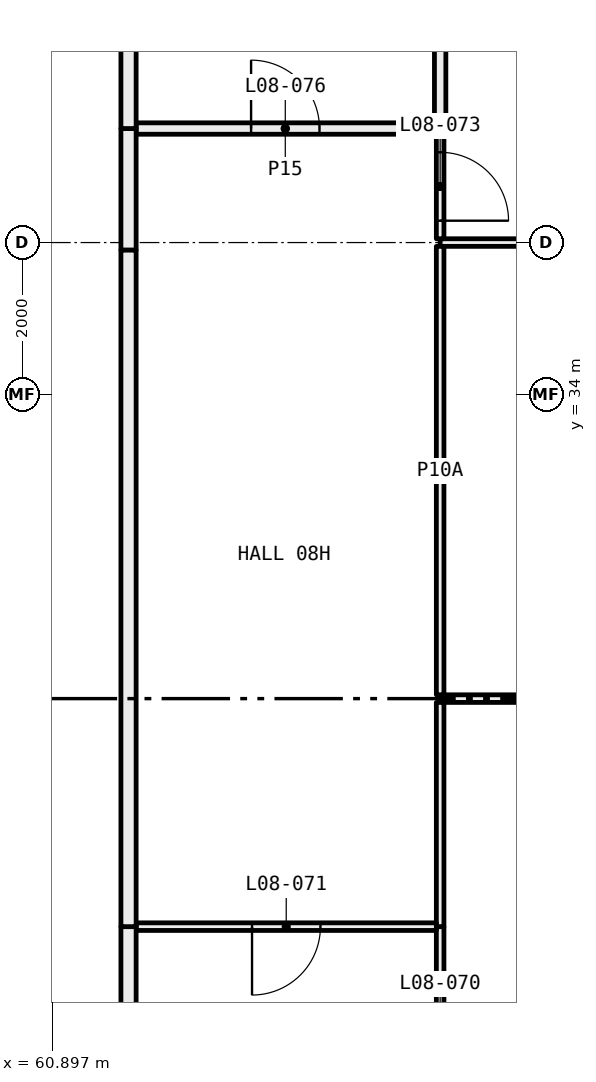
"""IFC4 building model, lengths in metres.
Left out: names, types, materials, properties, quantities, classifications, styles, units other than length and angle.
Written with IfcOpenShell. Run it as: python <this file> out.ifc"""

import sys

from ifc_helpers import new_model, si_unit, direction, frame, frame_2d, origin, place, context, subcontext, project, spatial, rectangle, extrude, element, fill, save


model = new_model("IFC4")
c1 = context("Model", 3, precision=1e-05, world=origin(), true_north=direction((0.0, 1.0)))
c2 = subcontext(c1, "Body", "Model", "MODEL_VIEW")
j1 = project(units=[si_unit("LENGTHUNIT", "METRE"), si_unit("PLANEANGLEUNIT", "RADIAN")], contexts=[c1])
p1 = place(None, origin())
s1 = spatial("IfcSite", under=j1, at=p1, CompositionType="ELEMENT")
p2 = place(p1, origin())
s2 = spatial("IfcBuilding", under=s1, at=p2, CompositionType="ELEMENT")
p3 = place(p2, frame((0.0, 0.0, 40.35)))
s3 = spatial("IfcBuildingStorey", under=s2, at=p3, CompositionType="ELEMENT", Elevation=40.35)
p4 = place(p3, frame((71.28, 30.0, 0.0), z_axis=(0.0, 0.0, 1.0), x_axis=(-1.0, 0.0, 0.0)))
e1 = element("IfcWall", 1, at=p4, inside=s3, PredefinedType="PARTITIONING", context=c2, shape_type="SweptSolid", body=[
    extrude(rectangle(XDim=5.28, YDim=0.1, at=frame_2d((2.64, 0.0))), origin(), (0.0, 0.0, 1.0), 3.05),
])
p5 = place(p4, frame((2.19, 0.0, 0.0)))
e2 = element("IfcOpeningElement", 2, at=p5, cuts=e1, PredefinedType="OPENING", context=c2, shape_type="SweptSolid", body=[
    extrude(rectangle(XDim=0.9, YDim=2.1, at=frame_2d((0.45, 1.05))), frame((0.0, 0.06, 0.0), z_axis=(0.0, -1.0, 0.0), x_axis=(1.0, 0.0, 0.0)), (0.0, 0.0, 1.0), 0.12),
])
p6 = place(p3, frame((66.0, 27.0, 0.0), z_axis=(0.0, 0.0, 1.0), x_axis=(0.0, -1.0, 0.0)))
e3 = element("IfcWall", 3, at=p6, inside=s3, PredefinedType="PARTITIONING", context=c2, shape_type="SweptSolid", body=[
    extrude(rectangle(XDim=3.1, YDim=0.1, at=frame_2d((1.55, 0.0))), origin(), (0.0, 0.0, 1.0), 2.45),
])
p7 = place(p6, frame((1.1, 0.0, 0.0)))
e4 = element("IfcOpeningElement", 4, at=p7, cuts=e3, PredefinedType="OPENING", context=c2, shape_type="SweptSolid", body=[
    extrude(rectangle(XDim=0.9, YDim=2.1, at=frame_2d((0.45, 1.05))), frame((0.0, 0.06, 0.0), z_axis=(0.0, -1.0, 0.0), x_axis=(1.0, 0.0, 0.0)), (0.0, 0.0, 1.0), 0.12),
])
p8 = place(p3, frame((66.0, 29.95, 0.0), z_axis=(0.0, 0.0, 1.0), x_axis=(0.0, -1.0, 0.0)))
e5 = element("IfcWall", 5, at=p8, inside=s3, PredefinedType="PARTITIONING", context=c2, shape_type="SweptSolid", body=[
    extrude(rectangle(XDim=2.95, YDim=0.1, at=frame_2d((1.475, 0.0))), origin(), (0.0, 0.0, 1.0), 3.05),
])
p9 = place(p3, frame((71.28, 36.0, 0.0), z_axis=(0.0, 0.0, 1.0), x_axis=(-1.0, 0.0, 0.0)))
e6 = element("IfcWall", 6, at=p9, inside=s3, PredefinedType="PARTITIONING", context=c2, shape_type="SweptSolid", body=[
    extrude(rectangle(XDim=5.28, YDim=0.1, at=frame_2d((2.64, 0.0))), origin(), (0.0, 0.0, 1.0), 2.45),
])
p10 = place(p3, frame((66.0, 35.95, 0.0), z_axis=(0.0, 0.0, 1.0), x_axis=(0.0, -1.0, 0.0)))
e7 = element("IfcWall", 7, at=p10, inside=s3, PredefinedType="PARTITIONING", context=c2, shape_type="SweptSolid", body=[
    extrude(rectangle(XDim=5.9, YDim=0.1, at=frame_2d((2.95, 0.0))), origin(), (0.0, 0.0, 1.0), 2.45),
])
p11 = place(p3, frame((66.0, 37.425, 0.0), z_axis=(0.0, 0.0, 1.0), x_axis=(0.0, -1.0, 0.0)))
e8 = element("IfcWall", 8, at=p11, inside=s3, PredefinedType="PARTITIONING", context=c2, shape_type="SweptSolid", body=[
    extrude(rectangle(XDim=1.375, YDim=0.1, at=frame_2d((0.688, 0.0))), origin(), (0.0, 0.0, 1.0), 2.45),
])
p12 = place(p11, frame((0.238, 0.0, 0.0)))
e9 = element("IfcOpeningElement", 9, at=p12, cuts=e8, PredefinedType="OPENING", context=c2, shape_type="SweptSolid", body=[
    extrude(rectangle(XDim=0.9, YDim=2.1, at=frame_2d((0.45, 1.05))), frame((0.0, 0.06, 0.0), z_axis=(0.0, -1.0, 0.0), x_axis=(1.0, 0.0, 0.0)), (0.0, 0.0, 1.0), 0.12),
])
p13 = place(p3, frame((66.0, 41.28, 0.0), z_axis=(0.0, 0.0, 1.0), x_axis=(0.0, -1.0, 0.0)))
e10 = element("IfcWall", 10, at=p13, inside=s3, PredefinedType="PARTITIONING", context=c2, shape_type="SweptSolid", body=[
    extrude(rectangle(XDim=3.78, YDim=0.15, at=frame_2d((1.89, 0.0))), origin(), (0.0, 0.0, 1.0), 3.05),
])
p14 = place(p3, frame((65.95, 27.0, 0.0), z_axis=(0.0, 0.0, 1.0), x_axis=(-1.0, 0.0, 0.0)))
e11 = element("IfcWall", 11, at=p14, inside=s3, PredefinedType="PARTITIONING", context=c2, shape_type="SweptSolid", body=[
    extrude(rectangle(XDim=3.95, YDim=0.1, at=frame_2d((1.975, 0.0))), origin(), (0.0, 0.0, 1.0), 3.05),
])
p15 = place(p14, frame((1.525, 0.0, 0.0)))
e12 = element("IfcOpeningElement", 12, at=p15, cuts=e11, PredefinedType="OPENING", context=c2, shape_type="SweptSolid", body=[
    extrude(rectangle(XDim=0.9, YDim=2.1, at=frame_2d((0.45, 1.05))), frame((0.0, 0.06, 0.0), z_axis=(0.0, -1.0, 0.0), x_axis=(1.0, 0.0, 0.0)), (0.0, 0.0, 1.0), 0.12),
])
p16 = place(p3, frame((61.9, 27.0, 0.0), z_axis=(0.0, 0.0, 1.0), x_axis=(0.0, -1.0, 0.0)))
e13 = element("IfcWall", 13, at=p16, inside=s3, PredefinedType="PARTITIONING", context=c2, shape_type="SweptSolid", body=[
    extrude(rectangle(XDim=3.1, YDim=0.2, at=frame_2d((1.55, 0.0))), origin(), (0.0, 0.0, 1.0), 2.45),
])
p17 = place(p16, frame((1.05, 0.0, 0.0)))
e14 = element("IfcOpeningElement", 14, at=p17, cuts=e13, PredefinedType="OPENING", context=c2, shape_type="SweptSolid", body=[
    extrude(rectangle(XDim=1.0, YDim=2.1, at=frame_2d((0.5, 1.05))), frame((0.0, 0.11, 0.0), z_axis=(0.0, -1.0, 0.0), x_axis=(1.0, 0.0, 0.0)), (0.0, 0.0, 1.0), 0.22),
])
p18 = place(p3, frame((65.925, 37.5, 0.0), z_axis=(0.0, 0.0, 1.0), x_axis=(-1.0, 0.0, 0.0)))
e15 = element("IfcWall", 15, at=p18, inside=s3, PredefinedType="PARTITIONING", context=c2, shape_type="SweptSolid", body=[
    extrude(rectangle(XDim=3.925, YDim=0.15, at=frame_2d((1.962, 0.0))), origin(), (0.0, 0.0, 1.0), 3.05),
])
p19 = place(p18, frame((1.512, 0.0, 0.0)))
e16 = element("IfcOpeningElement", 16, at=p19, cuts=e15, PredefinedType="OPENING", context=c2, shape_type="SweptSolid", body=[
    extrude(rectangle(XDim=0.9, YDim=2.1, at=frame_2d((0.45, 1.05))), frame((0.0, 0.085, 0.0), z_axis=(0.0, -1.0, 0.0), x_axis=(1.0, 0.0, 0.0)), (0.0, 0.0, 1.0), 0.17),
])
p20 = place(p3, frame((61.9, 37.5, 0.0), z_axis=(0.0, 0.0, 1.0), x_axis=(0.0, -1.0, 0.0)))
e17 = element("IfcWall", 17, at=p20, inside=s3, PredefinedType="PARTITIONING", context=c2, shape_type="SweptSolid", body=[
    extrude(rectangle(XDim=1.6, YDim=0.2, at=frame_2d((0.8, 0.0))), origin(), (0.0, 0.0, 1.0), 2.45),
])
p21 = place(p3, frame((61.9, 35.9, 0.0), z_axis=(0.0, 0.0, 1.0), x_axis=(0.0, -1.0, 0.0)))
e18 = element("IfcWall", 18, at=p21, inside=s3, PredefinedType="PARTITIONING", context=c2, shape_type="SweptSolid", body=[
    extrude(rectangle(XDim=8.9, YDim=0.2, at=frame_2d((4.45, 0.0))), origin(), (0.0, 0.0, 1.0), 3.05),
])
p22 = place(p3, frame((61.9, 41.9, 0.0), z_axis=(0.0, 0.0, 1.0), x_axis=(0.0, -1.0, 0.0)))
e19 = element("IfcWall", 19, at=p22, inside=s3, PredefinedType="PARTITIONING", context=c2, shape_type="SweptSolid", body=[
    extrude(rectangle(XDim=4.4, YDim=0.2, at=frame_2d((2.2, 0.0))), origin(), (0.0, 0.0, 1.0), 3.05),
])
p23 = place(p15, origin())
e20 = element("IfcDoor", 20, at=p23, inside=s3, OperationType="SINGLE_SWING_LEFT", PredefinedType="DOOR", context=c2, shape_type="SweptSolid", body=[
    extrude(rectangle(XDim=0.9, YDim=2.1, at=frame_2d((0.45, 1.05))), frame((0.0, 0.025, 0.0), z_axis=(0.0, -1.0, 0.0), x_axis=(1.0, 0.0, 0.0)), (0.0, 0.0, 1.0), 0.05),
])
fill(e12, e20)
p24 = place(p12, origin())
e21 = element("IfcDoor", 21, at=p24, inside=s3, OperationType="SINGLE_SWING_LEFT", PredefinedType="DOOR", context=c2, shape_type="SweptSolid", body=[
    extrude(rectangle(XDim=0.9, YDim=2.1, at=frame_2d((0.45, 1.05))), frame((0.0, 0.025, 0.0), z_axis=(0.0, -1.0, 0.0), x_axis=(1.0, 0.0, 0.0)), (0.0, 0.0, 1.0), 0.05),
])
fill(e9, e21)
p25 = place(p19, frame((0.9, 0.0, 0.0), x_axis=(-1.0, 0.0, 0.0)))
e22 = element("IfcDoor", 22, at=p25, inside=s3, OperationType="SINGLE_SWING_RIGHT", PredefinedType="DOOR", context=c2, shape_type="SweptSolid", body=[
    extrude(rectangle(XDim=0.9, YDim=2.1, at=frame_2d((0.45, 1.05))), frame((0.0, 0.025, 0.0), z_axis=(0.0, -1.0, 0.0), x_axis=(1.0, 0.0, 0.0)), (0.0, 0.0, 1.0), 0.05),
])
fill(e16, e22)
save(model, sys.argv[1])
